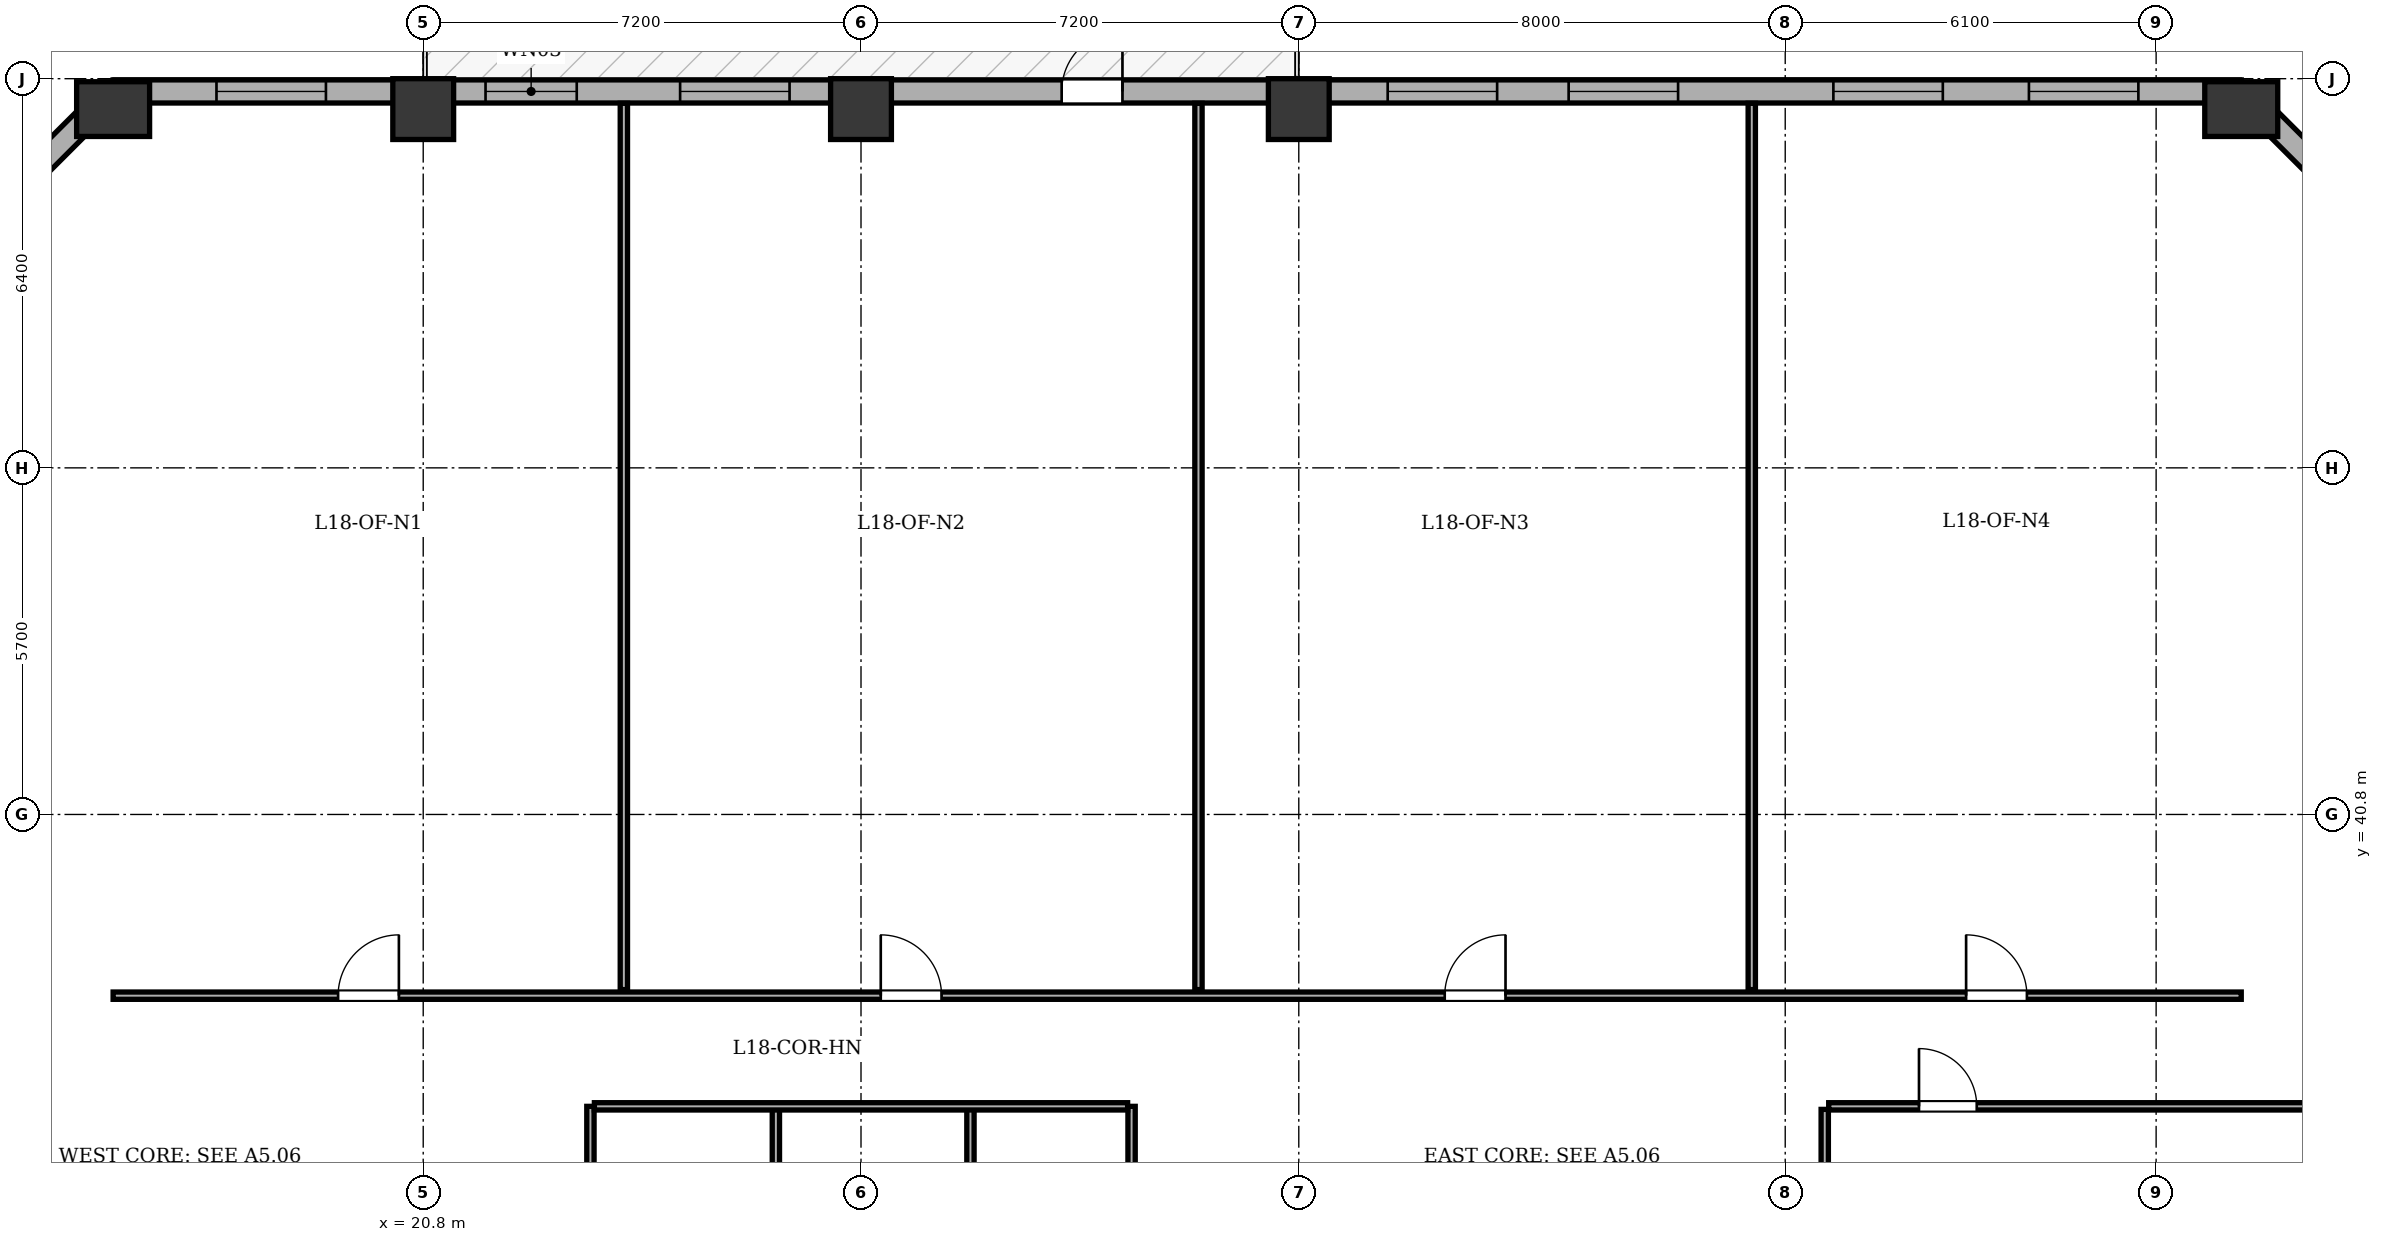
"""IFC4 building model, lengths in metres.
Left out: names, types, materials, properties, quantities, classifications, styles, units other than length and angle.
Written with IfcOpenShell. Run it as: python <this file> out.ifc"""

import sys

from ifc_helpers import new_model, si_unit, direction, frame, frame_2d, origin, origin_2d, place, context, subcontext, project, spatial, rectangle, extrude, element, fill, save


model = new_model("IFC4")
c1 = context("Model", 3, precision=1e-05, world=origin(), true_north=direction((0.0, 1.0)))
c2 = subcontext(c1, "Body", "Model", "MODEL_VIEW")
j1 = project(units=[si_unit("LENGTHUNIT", "METRE"), si_unit("PLANEANGLEUNIT", "RADIAN")], contexts=[c1])
p1 = place(None, origin())
s1 = spatial("IfcSite", under=j1, at=p1, CompositionType="ELEMENT")
p2 = place(p1, origin())
s2 = spatial("IfcBuilding", under=s1, at=p2, CompositionType="ELEMENT")
p3 = place(p2, frame((0.0, 0.0, 75.0)))
s3 = spatial("IfcBuildingStorey", under=s2, at=p3, CompositionType="ELEMENT", Elevation=75.0)
p4 = place(p3, frame((15.7, 52.4, 0.0), z_axis=(0.0, 0.0, 1.0), x_axis=(1.0, 0.0, 0.0)))
e1 = element("IfcColumn", 1, at=p4, inside=s3, PredefinedType="COLUMN", context=c2, shape_type="SweptSolid", body=[
    extrude(rectangle(XDim=0.9, YDim=1.2, at=origin_2d()), origin(), (0.0, 0.0, 1.0), 3.9),
])
for number, where, z_axis, x_axis in (
    (2, (20.8, 52.4, 0.0), (0.0, 0.0, 1.0), (1.0, 0.0, 0.0)),
    (3, (28.0, 52.4, 0.0), (0.0, 0.0, 1.0), (1.0, 0.0, 0.0)),
    (4, (35.2, 52.4, 0.0), (0.0, 0.0, 1.0), (1.0, 0.0, 0.0)),
):
    element("IfcColumn", number, at=place(p3, frame(where, z_axis=z_axis, x_axis=x_axis)), inside=s3, PredefinedType="COLUMN", context=c2, shape_type="SweptSolid", body=[
        extrude(rectangle(XDim=1.0, YDim=1.0, at=origin_2d()), origin(), (0.0, 0.0, 1.0), 3.9),
    ])
p5 = place(p3, frame((50.7, 52.4, 0.0), z_axis=(0.0, 0.0, 1.0), x_axis=(1.0, 0.0, 0.0)))
e5 = element("IfcColumn", 5, at=p5, inside=s3, PredefinedType="COLUMN", context=c2, shape_type="SweptSolid", body=[
    extrude(rectangle(XDim=0.9, YDim=1.2, at=origin_2d()), origin(), (0.0, 0.0, 1.0), 3.9),
])
p6 = place(p3, frame((10.91, 47.9, 0.0), z_axis=(0.0, 0.0, 1.0), x_axis=(0.707106781187, 0.707106781187, 0.0)))
e6 = element("IfcWall", 6, at=p6, inside=s3, PredefinedType="STANDARD", context=c2, shape_type="SweptSolid", body=[
    extrude(rectangle(XDim=6.774, YDim=0.38, at=frame_2d((3.387, 0.0))), origin(), (0.0, 0.0, 1.0), 3.135),
])
p7 = place(p6, frame((2.687, 0.0, 0.8)))
e7 = element("IfcOpeningElement", 7, at=p7, cuts=e6, PredefinedType="OPENING", context=c2, shape_type="SweptSolid", body=[
    extrude(rectangle(XDim=1.4, YDim=1.65, at=frame_2d((0.7, 0.825))), frame((0.0, 0.2, 0.0), z_axis=(0.0, -1.0, 0.0), x_axis=(1.0, 0.0, 0.0)), (0.0, 0.0, 1.0), 0.4),
])
p8 = place(p3, frame((15.7, 52.69, 0.0), z_axis=(0.0, 0.0, 1.0), x_axis=(1.0, 0.0, 0.0)))
e8 = element("IfcWall", 8, at=p8, inside=s3, PredefinedType="STANDARD", context=c2, shape_type="SweptSolid", body=[
    extrude(rectangle(XDim=35.0, YDim=0.38, at=frame_2d((17.5, 0.0))), origin(), (0.0, 0.0, 1.0), 3.135),
])
p9 = place(p8, frame((15.6, 0.0, 0.0)))
e9 = element("IfcOpeningElement", 9, at=p9, cuts=e8, PredefinedType="OPENING", context=c2, shape_type="SweptSolid", body=[
    extrude(rectangle(XDim=1.0, YDim=2.02, at=frame_2d((0.5, 1.01))), frame((0.0, 0.2, 0.0), z_axis=(0.0, -1.0, 0.0), x_axis=(1.0, 0.0, 0.0)), (0.0, 0.0, 1.0), 0.4),
])
p10 = place(p8, frame((1.7, 0.0, 0.8)))
e10 = element("IfcOpeningElement", 10, at=p10, cuts=e8, PredefinedType="OPENING", context=c2, shape_type="SweptSolid", body=[
    extrude(rectangle(XDim=1.8, YDim=1.9, at=frame_2d((0.9, 0.95))), frame((0.0, 0.2, 0.0), z_axis=(0.0, -1.0, 0.0), x_axis=(1.0, 0.0, 0.0)), (0.0, 0.0, 1.0), 0.4),
])
p11 = place(p8, frame((6.125, 0.0, 0.8)))
e11 = element("IfcOpeningElement", 11, at=p11, cuts=e8, PredefinedType="OPENING", context=c2, shape_type="SweptSolid", body=[
    extrude(rectangle(XDim=1.5, YDim=1.9, at=frame_2d((0.75, 0.95))), frame((0.0, 0.2, 0.0), z_axis=(0.0, -1.0, 0.0), x_axis=(1.0, 0.0, 0.0)), (0.0, 0.0, 1.0), 0.4),
])
p12 = place(p8, frame((9.325, 0.0, 0.8)))
e12 = element("IfcOpeningElement", 12, at=p12, cuts=e8, PredefinedType="OPENING", context=c2, shape_type="SweptSolid", body=[
    extrude(rectangle(XDim=1.8, YDim=1.9, at=frame_2d((0.9, 0.95))), frame((0.0, 0.2, 0.0), z_axis=(0.0, -1.0, 0.0), x_axis=(1.0, 0.0, 0.0)), (0.0, 0.0, 1.0), 0.4),
])
p13 = place(p8, frame((20.962, 0.0, 0.8)))
e13 = element("IfcOpeningElement", 13, at=p13, cuts=e8, PredefinedType="OPENING", context=c2, shape_type="SweptSolid", body=[
    extrude(rectangle(XDim=1.8, YDim=1.9, at=frame_2d((0.9, 0.95))), frame((0.0, 0.2, 0.0), z_axis=(0.0, -1.0, 0.0), x_axis=(1.0, 0.0, 0.0)), (0.0, 0.0, 1.0), 0.4),
])
p14 = place(p8, frame((23.938, 0.0, 0.8)))
e14 = element("IfcOpeningElement", 14, at=p14, cuts=e8, PredefinedType="OPENING", context=c2, shape_type="SweptSolid", body=[
    extrude(rectangle(XDim=1.8, YDim=1.9, at=frame_2d((0.9, 0.95))), frame((0.0, 0.2, 0.0), z_axis=(0.0, -1.0, 0.0), x_axis=(1.0, 0.0, 0.0)), (0.0, 0.0, 1.0), 0.4),
])
p15 = place(p8, frame((28.292, 0.0, 0.8)))
e15 = element("IfcOpeningElement", 15, at=p15, cuts=e8, PredefinedType="OPENING", context=c2, shape_type="SweptSolid", body=[
    extrude(rectangle(XDim=1.8, YDim=1.9, at=frame_2d((0.9, 0.95))), frame((0.0, 0.2, 0.0), z_axis=(0.0, -1.0, 0.0), x_axis=(1.0, 0.0, 0.0)), (0.0, 0.0, 1.0), 0.4),
])
p16 = place(p8, frame((31.508, 0.0, 0.8)))
e16 = element("IfcOpeningElement", 16, at=p16, cuts=e8, PredefinedType="OPENING", context=c2, shape_type="SweptSolid", body=[
    extrude(rectangle(XDim=1.8, YDim=1.9, at=frame_2d((0.9, 0.95))), frame((0.0, 0.2, 0.0), z_axis=(0.0, -1.0, 0.0), x_axis=(1.0, 0.0, 0.0)), (0.0, 0.0, 1.0), 0.4),
])
p17 = place(p3, frame((50.7, 52.69, 0.0), z_axis=(0.0, 0.0, 1.0), x_axis=(0.707106781187, -0.707106781187, 0.0)))
e17 = element("IfcWall", 17, at=p17, inside=s3, PredefinedType="STANDARD", context=c2, shape_type="SweptSolid", body=[
    extrude(rectangle(XDim=6.774, YDim=0.38, at=frame_2d((3.387, 0.0))), origin(), (0.0, 0.0, 1.0), 3.135),
])
p18 = place(p17, frame((2.687, 0.0, 0.8)))
e18 = element("IfcOpeningElement", 18, at=p18, cuts=e17, PredefinedType="OPENING", context=c2, shape_type="SweptSolid", body=[
    extrude(rectangle(XDim=1.4, YDim=1.65, at=frame_2d((0.7, 0.825))), frame((0.0, 0.2, 0.0), z_axis=(0.0, -1.0, 0.0), x_axis=(1.0, 0.0, 0.0)), (0.0, 0.0, 1.0), 0.4),
])
for number, where, z_axis, x_axis in (
    (19, (23.55, 24.715, 0.0), (0.0, 0.0, 1.0), (0.0, 1.0, 0.0)),
    (20, (32.45, 24.715, 0.0), (0.0, 0.0, 1.0), (0.0, 1.0, 0.0)),
    (21, (26.6, 24.715, 0.0), (0.0, 0.0, 1.0), (0.0, 1.0, 0.0)),
):
    element("IfcWall", number, at=place(p3, frame(where, z_axis=z_axis, x_axis=x_axis)), inside=s3, PredefinedType="PARTITIONING", context=c2, shape_type="SweptSolid", body=[
        extrude(rectangle(XDim=11.285, YDim=0.12, at=frame_2d((5.643, 0.0))), origin(), (0.0, 0.0, 1.0), 3.6),
    ])
p19 = place(p3, frame((29.8, 24.715, 0.0), z_axis=(0.0, 0.0, 1.0), x_axis=(0.0, 1.0, 0.0)))
e22 = element("IfcWall", 22, at=p19, inside=s3, PredefinedType="PARTITIONING", context=c2, shape_type="SweptSolid", body=[
    extrude(rectangle(XDim=11.285, YDim=0.12, at=frame_2d((5.643, 0.0))), origin(), (0.0, 0.0, 1.0), 3.135),
])
p20 = place(p3, frame((23.615, 36.0, 0.0), z_axis=(0.0, 0.0, 1.0), x_axis=(1.0, 0.0, 0.0)))
e23 = element("IfcWall", 23, at=p20, inside=s3, PredefinedType="PARTITIONING", context=c2, shape_type="SweptSolid", body=[
    extrude(rectangle(XDim=8.77, YDim=0.12, at=frame_2d((4.385, 0.0))), origin(), (0.0, 0.0, 1.0), 3.6),
])
p21 = place(p3, frame((15.7, 37.82, 0.0), z_axis=(0.0, 0.0, 1.0), x_axis=(1.0, 0.0, 0.0)))
e24 = element("IfcWall", 24, at=p21, inside=s3, PredefinedType="PARTITIONING", context=c2, shape_type="SweptSolid", body=[
    extrude(rectangle(XDim=35.0, YDim=0.12, at=frame_2d((17.5, 0.0))), origin(), (0.0, 0.0, 1.0), 3.6),
])
p22 = place(p21, frame((3.7, 0.0, 0.0)))
e25 = element("IfcOpeningElement", 25, at=p22, cuts=e24, PredefinedType="OPENING", context=c2, shape_type="SweptSolid", body=[
    extrude(rectangle(XDim=1.0, YDim=2.1, at=frame_2d((0.5, 1.05))), frame((0.0, 0.07, 0.0), z_axis=(0.0, -1.0, 0.0), x_axis=(1.0, 0.0, 0.0)), (0.0, 0.0, 1.0), 0.14),
])
p23 = place(p21, frame((12.625, 0.0, 0.0)))
e26 = element("IfcOpeningElement", 26, at=p23, cuts=e24, PredefinedType="OPENING", context=c2, shape_type="SweptSolid", body=[
    extrude(rectangle(XDim=1.0, YDim=2.1, at=frame_2d((0.5, 1.05))), frame((0.0, 0.07, 0.0), z_axis=(0.0, -1.0, 0.0), x_axis=(1.0, 0.0, 0.0)), (0.0, 0.0, 1.0), 0.14),
])
p24 = place(p21, frame((21.9, 0.0, 0.0)))
e27 = element("IfcOpeningElement", 27, at=p24, cuts=e24, PredefinedType="OPENING", context=c2, shape_type="SweptSolid", body=[
    extrude(rectangle(XDim=1.0, YDim=2.1, at=frame_2d((0.5, 1.05))), frame((0.0, 0.07, 0.0), z_axis=(0.0, -1.0, 0.0), x_axis=(1.0, 0.0, 0.0)), (0.0, 0.0, 1.0), 0.14),
])
p25 = place(p21, frame((30.475, 0.0, 0.0)))
e28 = element("IfcOpeningElement", 28, at=p25, cuts=e24, PredefinedType="OPENING", context=c2, shape_type="SweptSolid", body=[
    extrude(rectangle(XDim=1.0, YDim=2.1, at=frame_2d((0.5, 1.05))), frame((0.0, 0.07, 0.0), z_axis=(0.0, -1.0, 0.0), x_axis=(1.0, 0.0, 0.0)), (0.0, 0.0, 1.0), 0.14),
])
for number, where, z_axis, x_axis in (
    (29, (24.1, 37.92, 0.0), (0.0, 0.0, 1.0), (0.0, 1.0, 0.0)),
    (30, (33.55, 37.92, 0.0), (0.0, 0.0, 1.0), (0.0, 1.0, 0.0)),
):
    element("IfcWall", number, at=place(p3, frame(where, z_axis=z_axis, x_axis=x_axis)), inside=s3, PredefinedType="PARTITIONING", context=c2, shape_type="SweptSolid", body=[
        extrude(rectangle(XDim=14.575, YDim=0.12, at=frame_2d((7.288, 0.0))), origin(), (0.0, 0.0, 1.0), 3.135),
    ])
p26 = place(p3, frame((42.65, 37.92, 0.0), z_axis=(0.0, 0.0, 1.0), x_axis=(0.0, 1.0, 0.0)))
e31 = element("IfcWall", 31, at=p26, inside=s3, PredefinedType="PARTITIONING", context=c2, shape_type="SweptSolid", body=[
    extrude(rectangle(XDim=14.575, YDim=0.12, at=frame_2d((7.288, 0.0))), origin(), (0.0, 0.0, 1.0), 3.6),
])
p27 = place(p3, frame((43.85, 18.45, 0.0), z_axis=(0.0, 0.0, 1.0), x_axis=(0.0, 1.0, 0.0)))
e32 = element("IfcWall", 32, at=p27, inside=s3, PredefinedType="PARTITIONING", context=c2, shape_type="SweptSolid", body=[
    extrude(rectangle(XDim=17.5, YDim=0.12, at=frame_2d((8.75, 0.0))), origin(), (0.0, 0.0, 1.0), 3.6),
])
p28 = place(p3, frame((43.915, 36.0, 0.0), z_axis=(0.0, 0.0, 1.0), x_axis=(1.0, 0.0, 0.0)))
e33 = element("IfcWall", 33, at=p28, inside=s3, PredefinedType="PARTITIONING", context=c2, shape_type="SweptSolid", body=[
    extrude(rectangle(XDim=11.38, YDim=0.12, at=frame_2d((5.69, 0.0))), origin(), (0.0, 0.0, 1.0), 3.6),
])
p29 = place(p28, frame((1.485, 0.0, 0.0)))
e34 = element("IfcOpeningElement", 34, at=p29, cuts=e33, PredefinedType="OPENING", context=c2, shape_type="SweptSolid", body=[
    extrude(rectangle(XDim=0.95, YDim=2.1, at=frame_2d((0.475, 1.05))), frame((0.0, 0.07, 0.0), z_axis=(0.0, -1.0, 0.0), x_axis=(1.0, 0.0, 0.0)), (0.0, 0.0, 1.0), 0.14),
])
p30 = place(p9, origin())
e35 = element("IfcDoor", 35, at=p30, inside=s3, OperationType="SINGLE_SWING_RIGHT", PredefinedType="DOOR", context=c2, shape_type="SweptSolid", body=[
    extrude(rectangle(XDim=1.0, YDim=2.02, at=frame_2d((0.5, 1.01))), frame((0.0, 0.025, 0.0), z_axis=(0.0, -1.0, 0.0), x_axis=(1.0, 0.0, 0.0)), (0.0, 0.0, 1.0), 0.05),
])
fill(e9, e35)
p31 = place(p10, origin())
e36 = element("IfcWindow", 36, at=p31, inside=s3, PartitioningType="SINGLE_PANEL", PredefinedType="WINDOW", context=c2, shape_type="SweptSolid", body=[
    extrude(rectangle(XDim=1.8, YDim=1.9, at=frame_2d((0.9, 0.95))), frame((0.0, -0.01, 0.0), z_axis=(0.0, -1.0, 0.0), x_axis=(1.0, 0.0, 0.0)), (0.0, 0.0, 1.0), 0.06),
])
fill(e10, e36)
p32 = place(p11, origin())
e37 = element("IfcWindow", 37, at=p32, inside=s3, PartitioningType="SINGLE_PANEL", PredefinedType="WINDOW", context=c2, shape_type="SweptSolid", body=[
    extrude(rectangle(XDim=1.5, YDim=1.9, at=frame_2d((0.75, 0.95))), frame((0.0, -0.01, 0.0), z_axis=(0.0, -1.0, 0.0), x_axis=(1.0, 0.0, 0.0)), (0.0, 0.0, 1.0), 0.06),
])
fill(e11, e37)
p33 = place(p12, origin())
e38 = element("IfcWindow", 38, at=p33, inside=s3, PartitioningType="SINGLE_PANEL", PredefinedType="WINDOW", context=c2, shape_type="SweptSolid", body=[
    extrude(rectangle(XDim=1.8, YDim=1.9, at=frame_2d((0.9, 0.95))), frame((0.0, -0.01, 0.0), z_axis=(0.0, -1.0, 0.0), x_axis=(1.0, 0.0, 0.0)), (0.0, 0.0, 1.0), 0.06),
])
fill(e12, e38)
p34 = place(p13, origin())
e39 = element("IfcWindow", 39, at=p34, inside=s3, PartitioningType="SINGLE_PANEL", PredefinedType="WINDOW", context=c2, shape_type="SweptSolid", body=[
    extrude(rectangle(XDim=1.8, YDim=1.9, at=frame_2d((0.9, 0.95))), frame((0.0, -0.01, 0.0), z_axis=(0.0, -1.0, 0.0), x_axis=(1.0, 0.0, 0.0)), (0.0, 0.0, 1.0), 0.06),
])
fill(e13, e39)
p35 = place(p14, origin())
e40 = element("IfcWindow", 40, at=p35, inside=s3, PartitioningType="SINGLE_PANEL", PredefinedType="WINDOW", context=c2, shape_type="SweptSolid", body=[
    extrude(rectangle(XDim=1.8, YDim=1.9, at=frame_2d((0.9, 0.95))), frame((0.0, -0.01, 0.0), z_axis=(0.0, -1.0, 0.0), x_axis=(1.0, 0.0, 0.0)), (0.0, 0.0, 1.0), 0.06),
])
fill(e14, e40)
p36 = place(p15, origin())
e41 = element("IfcWindow", 41, at=p36, inside=s3, PartitioningType="SINGLE_PANEL", PredefinedType="WINDOW", context=c2, shape_type="SweptSolid", body=[
    extrude(rectangle(XDim=1.8, YDim=1.9, at=frame_2d((0.9, 0.95))), frame((0.0, -0.01, 0.0), z_axis=(0.0, -1.0, 0.0), x_axis=(1.0, 0.0, 0.0)), (0.0, 0.0, 1.0), 0.06),
])
fill(e15, e41)
p37 = place(p16, origin())
e42 = element("IfcWindow", 42, at=p37, inside=s3, PartitioningType="SINGLE_PANEL", PredefinedType="WINDOW", context=c2, shape_type="SweptSolid", body=[
    extrude(rectangle(XDim=1.8, YDim=1.9, at=frame_2d((0.9, 0.95))), frame((0.0, -0.01, 0.0), z_axis=(0.0, -1.0, 0.0), x_axis=(1.0, 0.0, 0.0)), (0.0, 0.0, 1.0), 0.06),
])
fill(e16, e42)
p38 = place(p22, origin())
e43 = element("IfcDoor", 43, at=p38, inside=s3, OperationType="SINGLE_SWING_RIGHT", PredefinedType="DOOR", context=c2, shape_type="SweptSolid", body=[
    extrude(rectangle(XDim=1.0, YDim=2.1, at=frame_2d((0.5, 1.05))), frame((0.0, 0.025, 0.0), z_axis=(0.0, -1.0, 0.0), x_axis=(1.0, 0.0, 0.0)), (0.0, 0.0, 1.0), 0.05),
])
fill(e25, e43)
p39 = place(p23, origin())
e44 = element("IfcDoor", 44, at=p39, inside=s3, OperationType="SINGLE_SWING_LEFT", PredefinedType="DOOR", context=c2, shape_type="SweptSolid", body=[
    extrude(rectangle(XDim=1.0, YDim=2.1, at=frame_2d((0.5, 1.05))), frame((0.0, 0.025, 0.0), z_axis=(0.0, -1.0, 0.0), x_axis=(1.0, 0.0, 0.0)), (0.0, 0.0, 1.0), 0.05),
])
fill(e26, e44)
p40 = place(p24, origin())
e45 = element("IfcDoor", 45, at=p40, inside=s3, OperationType="SINGLE_SWING_RIGHT", PredefinedType="DOOR", context=c2, shape_type="SweptSolid", body=[
    extrude(rectangle(XDim=1.0, YDim=2.1, at=frame_2d((0.5, 1.05))), frame((0.0, 0.025, 0.0), z_axis=(0.0, -1.0, 0.0), x_axis=(1.0, 0.0, 0.0)), (0.0, 0.0, 1.0), 0.05),
])
fill(e27, e45)
p41 = place(p25, origin())
e46 = element("IfcDoor", 46, at=p41, inside=s3, OperationType="SINGLE_SWING_LEFT", PredefinedType="DOOR", context=c2, shape_type="SweptSolid", body=[
    extrude(rectangle(XDim=1.0, YDim=2.1, at=frame_2d((0.5, 1.05))), frame((0.0, 0.025, 0.0), z_axis=(0.0, -1.0, 0.0), x_axis=(1.0, 0.0, 0.0)), (0.0, 0.0, 1.0), 0.05),
])
fill(e28, e46)
p42 = place(p29, origin())
e47 = element("IfcDoor", 47, at=p42, inside=s3, OperationType="SINGLE_SWING_LEFT", PredefinedType="DOOR", context=c2, shape_type="SweptSolid", body=[
    extrude(rectangle(XDim=0.95, YDim=2.1, at=frame_2d((0.475, 1.05))), frame((0.0, 0.025, 0.0), z_axis=(0.0, -1.0, 0.0), x_axis=(1.0, 0.0, 0.0)), (0.0, 0.0, 1.0), 0.05),
])
fill(e34, e47)
save(model, sys.argv[1])
